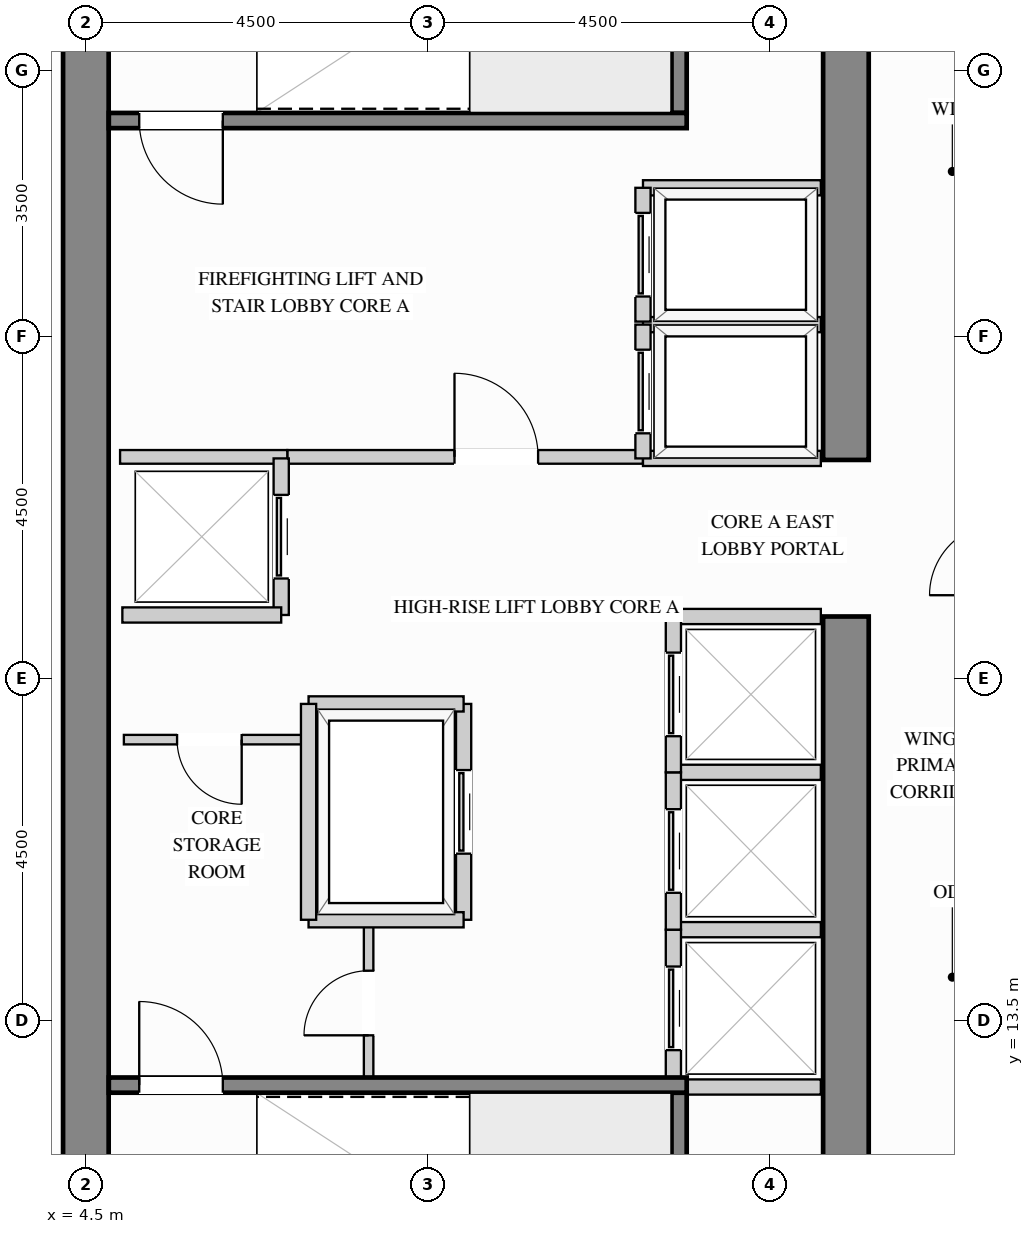
"""IFC4 building model, lengths in metres.
Left out: names, types, materials, properties, quantities, classifications, styles, units other than length and angle.
Written with IfcOpenShell. Run it as: python <this file> out.ifc"""

import sys

from ifc_helpers import new_model, si_unit, direction, frame, frame_2d, origin, place, context, subcontext, project, spatial, rectangle, extrude, source, transform, mapped, element, fill, save


model = new_model("IFC4")
c1 = context("Model", 3, precision=1e-05, world=origin(), true_north=direction((0.0, 1.0)))
c2 = subcontext(c1, "Body", "Model", "MODEL_VIEW")
j1 = project(units=[si_unit("LENGTHUNIT", "METRE"), si_unit("PLANEANGLEUNIT", "RADIAN")], contexts=[c1])
p1 = place(None, origin())
s1 = spatial("IfcSite", under=j1, at=p1, CompositionType="ELEMENT")
p2 = place(p1, origin())
s2 = spatial("IfcBuilding", under=s1, at=p2, CompositionType="ELEMENT")
p3 = place(p2, frame((0.0, 0.0, 161.1)))
s3 = spatial("IfcBuildingStorey", under=s2, at=p3, CompositionType="ELEMENT", Elevation=161.1)
m1 = source(origin(), c2, "Body", "SweptSolid", [
    extrude(rectangle(XDim=10.02, YDim=0.6, at=frame_2d((5.01, 0.0))), origin(), (0.0, 0.0, 1.0), 3.4),
])
p4 = place(p3, frame((14.5, 8.8, 0.0), z_axis=(0.0, 0.0, 1.0), x_axis=(0.0, 1.0, 0.0)))
e1 = element("IfcWall", 1, at=p4, inside=s3, PredefinedType="SHEAR", context=c2, shape_type="MappedRepresentation", body=[
    mapped(m1, transform((0.0, 0.0, 0.0), x_axis=(1.0, 0.0, 0.0), y_axis=(0.0, 1.0, 0.0), z_axis=(0.0, 0.0, 1.0))),
])
m2 = source(origin(), c2, "Body", "SweptSolid", [
    extrude(rectangle(XDim=8.32, YDim=0.6, at=frame_2d((4.16, 0.0))), origin(), (0.0, 0.0, 1.0), 3.4),
])
p5 = place(p3, frame((14.5, 20.88, 0.0), z_axis=(0.0, 0.0, 1.0), x_axis=(0.0, 1.0, 0.0)))
e2 = element("IfcWall", 2, at=p5, inside=s3, PredefinedType="SHEAR", context=c2, shape_type="MappedRepresentation", body=[
    mapped(m2, transform((0.0, 0.0, 0.0), x_axis=(1.0, 0.0, 0.0), y_axis=(0.0, 1.0, 0.0), z_axis=(0.0, 0.0, 1.0))),
])
m3 = source(origin(), c2, "Body", "SweptSolid", [
    extrude(rectangle(XDim=20.4, YDim=0.6, at=frame_2d((10.2, 0.0))), origin(), (0.0, 0.0, 1.0), 3.4),
])
p6 = place(p3, frame((4.5, 8.8, 0.0), z_axis=(0.0, 0.0, 1.0), x_axis=(0.0, 1.0, 0.0)))
e3 = element("IfcWall", 3, at=p6, inside=s3, PredefinedType="SHEAR", context=c2, shape_type="MappedRepresentation", body=[
    mapped(m3, transform((0.0, 0.0, 0.0), x_axis=(1.0, 0.0, 0.0), y_axis=(0.0, 1.0, 0.0), z_axis=(0.0, 0.0, 1.0))),
])
p7 = place(p3, frame((7.15, 20.92, 0.0), z_axis=(0.0, 0.0, 1.0), x_axis=(1.0, 0.0, 0.0)))
e4 = element("IfcWall", 4, at=p7, inside=s3, PredefinedType="PARTITIONING", context=c2, shape_type="SweptSolid", body=[
    extrude(rectangle(XDim=4.68, YDim=0.18, at=frame_2d((2.34, 0.0))), origin(), (0.0, 0.0, 1.0), 3.385),
])
p8 = place(p7, frame((2.2, 0.0, 0.0)))
e5 = element("IfcOpeningElement", 5, at=p8, cuts=e4, PredefinedType="OPENING", context=c2, shape_type="SweptSolid", body=[
    extrude(rectangle(XDim=1.1, YDim=2.15, at=frame_2d((0.55, 1.075))), frame((0.0, 0.1, 0.0), z_axis=(0.0, -1.0, 0.0), x_axis=(1.0, 0.0, 0.0)), (0.0, 0.0, 1.0), 0.2),
])
m4 = source(origin(), c2, "Body", "SweptSolid", [
    extrude(rectangle(XDim=2.2, YDim=0.18, at=frame_2d((1.1, 0.0))), origin(), (0.0, 0.0, 1.0), 3.385),
])
p9 = place(p3, frame((4.95, 20.92, 0.0), z_axis=(0.0, 0.0, 1.0), x_axis=(1.0, 0.0, 0.0)))
e6 = element("IfcWall", 6, at=p9, inside=s3, PredefinedType="PARTITIONING", context=c2, shape_type="MappedRepresentation", body=[
    mapped(m4, transform((0.0, 0.0, 0.0), x_axis=(1.0, 0.0, 0.0), y_axis=(0.0, 1.0, 0.0), z_axis=(0.0, 0.0, 1.0))),
])
p10 = place(p3, frame((8.22, 12.75, 0.0), z_axis=(0.0, 0.0, 1.0), x_axis=(0.0, 1.0, 0.0)))
e7 = element("IfcWall", 7, at=p10, inside=s3, PredefinedType="PARTITIONING", context=c2, shape_type="SweptSolid", body=[
    extrude(rectangle(XDim=2.07, YDim=0.125, at=frame_2d((1.035, 0.0))), origin(), (0.0, 0.0, 1.0), 3.385),
])
p11 = place(p10, frame((0.56, 0.0, 0.0)))
e8 = element("IfcOpeningElement", 8, at=p11, cuts=e7, PredefinedType="OPENING", context=c2, shape_type="SweptSolid", body=[
    extrude(rectangle(XDim=0.85, YDim=2.1, at=frame_2d((0.425, 1.05))), frame((0.0, 0.073, 0.0), z_axis=(0.0, -1.0, 0.0), x_axis=(1.0, 0.0, 0.0)), (0.0, 0.0, 1.0), 0.145),
])
p12 = place(p3, frame((5.0, 17.2, 0.0), z_axis=(0.0, 0.0, 1.0), x_axis=(1.0, 0.0, 0.0)))
e9 = element("IfcWall", 9, at=p12, inside=s3, PredefinedType="PARTITIONING", context=c2, shape_type="SweptSolid", body=[
    extrude(rectangle(XDim=2.4, YDim=0.125, at=frame_2d((1.2, 0.0))), origin(), (0.0, 0.0, 1.0), 3.385),
])
p13 = place(p12, frame((0.7, 0.0, 0.0)))
e10 = element("IfcOpeningElement", 10, at=p13, cuts=e9, PredefinedType="OPENING", context=c2, shape_type="SweptSolid", body=[
    extrude(rectangle(XDim=0.85, YDim=2.1, at=frame_2d((0.425, 1.05))), frame((0.0, 0.073, 0.0), z_axis=(0.0, -1.0, 0.0), x_axis=(1.0, 0.0, 0.0)), (0.0, 0.0, 1.0), 0.145),
])
m5 = source(origin(), c2, "Body", "SweptSolid", [
    extrude(rectangle(XDim=2.34, YDim=0.2, at=frame_2d((1.17, 0.0))), origin(), (0.0, 0.0, 1.0), 3.385),
])
for number, where, z_axis, x_axis in (
    (11, (11.83, 22.66, 0.0), (0.0, 0.0, 1.0), (1.0, 0.0, 0.0)),
    (12, (11.83, 20.9, 0.0), (0.0, 0.0, 1.0), (1.0, 0.0, 0.0)),
):
    element("IfcWall", number, at=place(p3, frame(where, z_axis=z_axis, x_axis=x_axis)), inside=s3, PredefinedType="PARTITIONING", context=c2, shape_type="MappedRepresentation", body=[
        mapped(m5, transform((0.0, 0.0, 0.0), x_axis=(1.0, 0.0, 0.0), y_axis=(0.0, 1.0, 0.0), z_axis=(0.0, 0.0, 1.0))),
    ])
p14 = place(p3, frame((11.83, 20.9, 0.0), z_axis=(0.0, 0.0, 1.0), x_axis=(0.0, 1.0, 0.0)))
e13 = element("IfcWall", 13, at=p14, inside=s3, PredefinedType="PARTITIONING", context=c2, shape_type="SweptSolid", body=[
    extrude(rectangle(XDim=1.76, YDim=0.2, at=frame_2d((0.88, 0.0))), origin(), (0.0, 0.0, 1.0), 3.385),
])
p15 = place(p14, frame((0.33, 0.0, 0.0)))
e14 = element("IfcOpeningElement", 14, at=p15, cuts=e13, PredefinedType="OPENING", context=c2, shape_type="SweptSolid", body=[
    extrude(rectangle(XDim=1.1, YDim=2.2, at=frame_2d((0.55, 1.1))), frame((0.0, 0.11, 0.0), z_axis=(0.0, -1.0, 0.0), x_axis=(1.0, 0.0, 0.0)), (0.0, 0.0, 1.0), 0.22),
])
p16 = place(p3, frame((11.83, 24.46, 0.0), z_axis=(0.0, 0.0, 1.0), x_axis=(1.0, 0.0, 0.0)))
e15 = element("IfcWall", 15, at=p16, inside=s3, PredefinedType="PARTITIONING", context=c2, shape_type="MappedRepresentation", body=[
    mapped(m5, transform((0.0, 0.0, 0.0), x_axis=(1.0, 0.0, 0.0), y_axis=(0.0, 1.0, 0.0), z_axis=(0.0, 0.0, 1.0))),
])
p17 = place(p3, frame((11.83, 22.7, 0.0), z_axis=(0.0, 0.0, 1.0), x_axis=(0.0, 1.0, 0.0)))
e16 = element("IfcWall", 16, at=p17, inside=s3, PredefinedType="PARTITIONING", context=c2, shape_type="SweptSolid", body=[
    extrude(rectangle(XDim=1.76, YDim=0.2, at=frame_2d((0.88, 0.0))), origin(), (0.0, 0.0, 1.0), 3.385),
])
p18 = place(p17, frame((0.33, 0.0, 0.0)))
e17 = element("IfcOpeningElement", 17, at=p18, cuts=e16, PredefinedType="OPENING", context=c2, shape_type="SweptSolid", body=[
    extrude(rectangle(XDim=1.1, YDim=2.2, at=frame_2d((0.55, 1.1))), frame((0.0, 0.11, 0.0), z_axis=(0.0, -1.0, 0.0), x_axis=(1.0, 0.0, 0.0)), (0.0, 0.0, 1.0), 0.22),
])
m6 = source(origin(), c2, "Body", "SweptSolid", [
    extrude(rectangle(XDim=1.94, YDim=0.2, at=frame_2d((0.97, 0.0))), origin(), (0.0, 0.0, 1.0), 3.385),
])
for number, where, z_axis, x_axis in (
    (18, (12.23, 14.7, 0.0), (0.0, 0.0, 1.0), (1.0, 0.0, 0.0)),
    (19, (12.23, 12.63, 0.0), (0.0, 0.0, 1.0), (1.0, 0.0, 0.0)),
):
    element("IfcWall", number, at=place(p3, frame(where, z_axis=z_axis, x_axis=x_axis)), inside=s3, PredefinedType="PARTITIONING", context=c2, shape_type="MappedRepresentation", body=[
        mapped(m6, transform((0.0, 0.0, 0.0), x_axis=(1.0, 0.0, 0.0), y_axis=(0.0, 1.0, 0.0), z_axis=(0.0, 0.0, 1.0))),
    ])
p19 = place(p3, frame((12.23, 12.63, 0.0), z_axis=(0.0, 0.0, 1.0), x_axis=(0.0, 1.0, 0.0)))
e20 = element("IfcWall", 20, at=p19, inside=s3, PredefinedType="PARTITIONING", context=c2, shape_type="SweptSolid", body=[
    extrude(rectangle(XDim=2.07, YDim=0.2, at=frame_2d((1.035, 0.0))), origin(), (0.0, 0.0, 1.0), 3.385),
])
p20 = place(p19, frame((0.485, 0.0, 0.0)))
e21 = element("IfcOpeningElement", 21, at=p20, cuts=e20, PredefinedType="OPENING", context=c2, shape_type="SweptSolid", body=[
    extrude(rectangle(XDim=1.1, YDim=2.2, at=frame_2d((0.55, 1.1))), frame((0.0, 0.11, 0.0), z_axis=(0.0, -1.0, 0.0), x_axis=(1.0, 0.0, 0.0)), (0.0, 0.0, 1.0), 0.22),
])
p21 = place(p3, frame((12.23, 16.77, 0.0), z_axis=(0.0, 0.0, 1.0), x_axis=(1.0, 0.0, 0.0)))
e22 = element("IfcWall", 22, at=p21, inside=s3, PredefinedType="PARTITIONING", context=c2, shape_type="MappedRepresentation", body=[
    mapped(m6, transform((0.0, 0.0, 0.0), x_axis=(1.0, 0.0, 0.0), y_axis=(0.0, 1.0, 0.0), z_axis=(0.0, 0.0, 1.0))),
])
p22 = place(p3, frame((12.23, 14.7, 0.0), z_axis=(0.0, 0.0, 1.0), x_axis=(0.0, 1.0, 0.0)))
e23 = element("IfcWall", 23, at=p22, inside=s3, PredefinedType="PARTITIONING", context=c2, shape_type="SweptSolid", body=[
    extrude(rectangle(XDim=2.07, YDim=0.2, at=frame_2d((1.035, 0.0))), origin(), (0.0, 0.0, 1.0), 3.385),
])
p23 = place(p22, frame((0.485, 0.0, 0.0)))
e24 = element("IfcOpeningElement", 24, at=p23, cuts=e23, PredefinedType="OPENING", context=c2, shape_type="SweptSolid", body=[
    extrude(rectangle(XDim=1.1, YDim=2.2, at=frame_2d((0.55, 1.1))), frame((0.0, 0.11, 0.0), z_axis=(0.0, -1.0, 0.0), x_axis=(1.0, 0.0, 0.0)), (0.0, 0.0, 1.0), 0.22),
])
p24 = place(p3, frame((12.23, 18.82, 0.0), z_axis=(0.0, 0.0, 1.0), x_axis=(1.0, 0.0, 0.0)))
e25 = element("IfcWall", 25, at=p24, inside=s3, PredefinedType="PARTITIONING", context=c2, shape_type="MappedRepresentation", body=[
    mapped(m6, transform((0.0, 0.0, 0.0), x_axis=(1.0, 0.0, 0.0), y_axis=(0.0, 1.0, 0.0), z_axis=(0.0, 0.0, 1.0))),
])
p25 = place(p3, frame((12.23, 16.77, 0.0), z_axis=(0.0, 0.0, 1.0), x_axis=(0.0, 1.0, 0.0)))
e26 = element("IfcWall", 26, at=p25, inside=s3, PredefinedType="PARTITIONING", context=c2, shape_type="SweptSolid", body=[
    extrude(rectangle(XDim=2.05, YDim=0.2, at=frame_2d((1.025, 0.0))), origin(), (0.0, 0.0, 1.0), 3.385),
])
p26 = place(p25, frame((0.475, 0.0, 0.0)))
e27 = element("IfcOpeningElement", 27, at=p26, cuts=e26, PredefinedType="OPENING", context=c2, shape_type="SweptSolid", body=[
    extrude(rectangle(XDim=1.1, YDim=2.2, at=frame_2d((0.55, 1.1))), frame((0.0, 0.11, 0.0), z_axis=(0.0, -1.0, 0.0), x_axis=(1.0, 0.0, 0.0)), (0.0, 0.0, 1.0), 0.22),
])
p27 = place(p3, frame((7.07, 18.84, 0.0), z_axis=(0.0, 0.0, 1.0), x_axis=(0.0, 1.0, 0.0)))
e28 = element("IfcWall", 28, at=p27, inside=s3, PredefinedType="PARTITIONING", context=c2, shape_type="SweptSolid", body=[
    extrude(rectangle(XDim=2.06, YDim=0.2, at=frame_2d((1.03, 0.0))), origin(), (0.0, 0.0, 1.0), 3.385),
])
p28 = place(p27, frame((0.48, 0.0, 0.0)))
e29 = element("IfcOpeningElement", 29, at=p28, cuts=e28, PredefinedType="OPENING", context=c2, shape_type="SweptSolid", body=[
    extrude(rectangle(XDim=1.1, YDim=2.2, at=frame_2d((0.55, 1.1))), frame((0.0, 0.11, 0.0), z_axis=(0.0, -1.0, 0.0), x_axis=(1.0, 0.0, 0.0)), (0.0, 0.0, 1.0), 0.22),
])
m7 = source(origin(), c2, "Body", "SweptSolid", [
    extrude(rectangle(XDim=2.09, YDim=0.2, at=frame_2d((1.045, 0.0))), origin(), (0.0, 0.0, 1.0), 3.385),
])
p29 = place(p3, frame((4.98, 18.84, 0.0), z_axis=(0.0, 0.0, 1.0), x_axis=(1.0, 0.0, 0.0)))
e30 = element("IfcWall", 30, at=p29, inside=s3, PredefinedType="PARTITIONING", context=c2, shape_type="MappedRepresentation", body=[
    mapped(m7, transform((0.0, 0.0, 0.0), x_axis=(1.0, 0.0, 0.0), y_axis=(0.0, 1.0, 0.0), z_axis=(0.0, 0.0, 1.0))),
])
p30 = place(p3, frame((9.47, 14.83, 0.0), z_axis=(0.0, 0.0, 1.0), x_axis=(0.0, 1.0, 0.0)))
e31 = element("IfcWall", 31, at=p30, inside=s3, PredefinedType="PARTITIONING", context=c2, shape_type="SweptSolid", body=[
    extrude(rectangle(XDim=2.84, YDim=0.2, at=frame_2d((1.42, 0.0))), origin(), (0.0, 0.0, 1.0), 3.385),
])
p31 = place(p30, frame((0.87, 0.0, 0.0)))
e32 = element("IfcOpeningElement", 32, at=p31, cuts=e31, PredefinedType="OPENING", context=c2, shape_type="SweptSolid", body=[
    extrude(rectangle(XDim=1.1, YDim=2.2, at=frame_2d((0.55, 1.1))), frame((0.0, 0.11, 0.0), z_axis=(0.0, -1.0, 0.0), x_axis=(1.0, 0.0, 0.0)), (0.0, 0.0, 1.0), 0.22),
])
m8 = source(origin(), c2, "Body", "SweptSolid", [
    extrude(rectangle(XDim=2.04, YDim=0.2, at=frame_2d((1.02, 0.0))), origin(), (0.0, 0.0, 1.0), 3.385),
])
for number, where, z_axis, x_axis in (
    (33, (7.43, 17.67, 0.0), (0.0, 0.0, 1.0), (1.0, 0.0, 0.0)),
    (34, (7.43, 14.83, 0.0), (0.0, 0.0, 1.0), (1.0, 0.0, 0.0)),
):
    element("IfcWall", number, at=place(p3, frame(where, z_axis=z_axis, x_axis=x_axis)), inside=s3, PredefinedType="PARTITIONING", context=c2, shape_type="MappedRepresentation", body=[
        mapped(m8, transform((0.0, 0.0, 0.0), x_axis=(1.0, 0.0, 0.0), y_axis=(0.0, 1.0, 0.0), z_axis=(0.0, 0.0, 1.0))),
    ])
m9 = source(origin(), c2, "Body", "SweptSolid", [
    extrude(rectangle(XDim=2.84, YDim=0.2, at=frame_2d((1.42, 0.0))), origin(), (0.0, 0.0, 1.0), 3.385),
])
p32 = place(p3, frame((7.43, 14.83, 0.0), z_axis=(0.0, 0.0, 1.0), x_axis=(0.0, 1.0, 0.0)))
e35 = element("IfcWall", 35, at=p32, inside=s3, PredefinedType="PARTITIONING", context=c2, shape_type="MappedRepresentation", body=[
    mapped(m9, transform((0.0, 0.0, 0.0), x_axis=(1.0, 0.0, 0.0), y_axis=(0.0, 1.0, 0.0), z_axis=(0.0, 0.0, 1.0))),
])
m10 = source(origin(), c2, "Body", "SweptSolid", [
    extrude(rectangle(XDim=3.753, YDim=0.2, at=frame_2d((1.876, 0.0))), origin(), (0.0, 0.0, 1.0), 3.4),
])
p33 = place(p3, frame((12.305, 8.802, 0.0), z_axis=(0.0, 0.0, 1.0), x_axis=(0.0, 1.0, 0.0)))
e36 = element("IfcWall", 36, at=p33, inside=s3, PredefinedType="SHEAR", context=c2, shape_type="MappedRepresentation", body=[
    mapped(m10, transform((0.0, 0.0, 0.0), x_axis=(1.0, 0.0, 0.0), y_axis=(0.0, 1.0, 0.0), z_axis=(0.0, 0.0, 1.0))),
])
p34 = place(p3, frame((4.802, 12.655, 0.0), z_axis=(0.0, 0.0, 1.0), x_axis=(1.0, 0.0, 0.0)))
e37 = element("IfcWall", 37, at=p34, inside=s3, PredefinedType="SHEAR", context=c2, shape_type="SweptSolid", body=[
    extrude(rectangle(XDim=7.603, YDim=0.2, at=frame_2d((3.802, 0.0))), origin(), (0.0, 0.0, 1.0), 3.4),
])
p35 = place(p34, frame((0.4, 0.0, 0.0)))
e38 = element("IfcOpeningElement", 38, at=p35, cuts=e37, PredefinedType="OPENING", context=c2, shape_type="SweptSolid", body=[
    extrude(rectangle(XDim=1.1, YDim=2.15, at=frame_2d((0.55, 1.075))), frame((0.0, 0.11, 0.0), z_axis=(0.0, -1.0, 0.0), x_axis=(1.0, 0.0, 0.0)), (0.0, 0.0, 1.0), 0.22),
])
p36 = place(p3, frame((12.305, 25.445, 0.0), z_axis=(0.0, 0.0, 1.0), x_axis=(0.0, 1.0, 0.0)))
e39 = element("IfcWall", 39, at=p36, inside=s3, PredefinedType="SHEAR", context=c2, shape_type="MappedRepresentation", body=[
    mapped(m10, transform((0.0, 0.0, 0.0), x_axis=(1.0, 0.0, 0.0), y_axis=(0.0, 1.0, 0.0), z_axis=(0.0, 0.0, 1.0))),
])
p37 = place(p3, frame((4.802, 25.345, 0.0), z_axis=(0.0, 0.0, 1.0), x_axis=(1.0, 0.0, 0.0)))
e40 = element("IfcWall", 40, at=p37, inside=s3, PredefinedType="SHEAR", context=c2, shape_type="SweptSolid", body=[
    extrude(rectangle(XDim=7.603, YDim=0.2, at=frame_2d((3.802, 0.0))), origin(), (0.0, 0.0, 1.0), 3.4),
])
p38 = place(p37, frame((0.4, 0.0, 0.0)))
e41 = element("IfcOpeningElement", 41, at=p38, cuts=e40, PredefinedType="OPENING", context=c2, shape_type="SweptSolid", body=[
    extrude(rectangle(XDim=1.1, YDim=2.15, at=frame_2d((0.55, 1.075))), frame((0.0, 0.11, 0.0), z_axis=(0.0, -1.0, 0.0), x_axis=(1.0, 0.0, 0.0)), (0.0, 0.0, 1.0), 0.22),
])
m11 = source(origin(), c2, "Body", "SweptSolid", [
    extrude(rectangle(XDim=1.1, YDim=2.15, at=frame_2d((0.55, 1.075))), frame((0.0, 0.025, 0.0), z_axis=(0.0, -1.0, 0.0), x_axis=(1.0, 0.0, 0.0)), (0.0, 0.0, 1.0), 0.05),
])
p39 = place(p8, origin())
e42 = element("IfcDoor", 42, at=p39, inside=s3, OperationType="SINGLE_SWING_LEFT", PredefinedType="DOOR", context=c2, shape_type="MappedRepresentation", body=[
    mapped(m11, transform((0.0, 0.0, 0.0), x_axis=(1.0, 0.0, 0.0), y_axis=(0.0, 1.0, 0.0), z_axis=(0.0, 0.0, 1.0))),
])
fill(e5, e42)
m12 = source(origin(), c2, "Body", "SweptSolid", [
    extrude(rectangle(XDim=1.1, YDim=2.2, at=frame_2d((0.55, 1.1))), frame((0.0, 0.025, 0.0), z_axis=(0.0, -1.0, 0.0), x_axis=(1.0, 0.0, 0.0)), (0.0, 0.0, 1.0), 0.05),
])
p40 = place(p15, origin())
e43 = element("IfcDoor", 43, at=p40, inside=s3, OperationType="SLIDING_TO_LEFT", PredefinedType="DOOR", context=c2, shape_type="MappedRepresentation", body=[
    mapped(m12, transform((0.0, 0.0, 0.0), x_axis=(1.0, 0.0, 0.0), y_axis=(0.0, 1.0, 0.0), z_axis=(0.0, 0.0, 1.0))),
])
fill(e14, e43)
p41 = place(p18, origin())
e44 = element("IfcDoor", 44, at=p41, inside=s3, OperationType="SLIDING_TO_LEFT", PredefinedType="DOOR", context=c2, shape_type="MappedRepresentation", body=[
    mapped(m12, transform((0.0, 0.0, 0.0), x_axis=(1.0, 0.0, 0.0), y_axis=(0.0, 1.0, 0.0), z_axis=(0.0, 0.0, 1.0))),
])
fill(e17, e44)
p42 = place(p20, origin())
e45 = element("IfcDoor", 45, at=p42, inside=s3, OperationType="SLIDING_TO_LEFT", PredefinedType="DOOR", context=c2, shape_type="MappedRepresentation", body=[
    mapped(m12, transform((0.0, 0.0, 0.0), x_axis=(1.0, 0.0, 0.0), y_axis=(0.0, 1.0, 0.0), z_axis=(0.0, 0.0, 1.0))),
])
fill(e21, e45)
p43 = place(p23, origin())
e46 = element("IfcDoor", 46, at=p43, inside=s3, OperationType="SLIDING_TO_LEFT", PredefinedType="DOOR", context=c2, shape_type="MappedRepresentation", body=[
    mapped(m12, transform((0.0, 0.0, 0.0), x_axis=(1.0, 0.0, 0.0), y_axis=(0.0, 1.0, 0.0), z_axis=(0.0, 0.0, 1.0))),
])
fill(e24, e46)
p44 = place(p26, origin())
e47 = element("IfcDoor", 47, at=p44, inside=s3, OperationType="SLIDING_TO_LEFT", PredefinedType="DOOR", context=c2, shape_type="MappedRepresentation", body=[
    mapped(m12, transform((0.0, 0.0, 0.0), x_axis=(1.0, 0.0, 0.0), y_axis=(0.0, 1.0, 0.0), z_axis=(0.0, 0.0, 1.0))),
])
fill(e27, e47)
p45 = place(p28, origin())
e48 = element("IfcDoor", 48, at=p45, inside=s3, OperationType="SLIDING_TO_LEFT", PredefinedType="DOOR", context=c2, shape_type="MappedRepresentation", body=[
    mapped(m12, transform((0.0, 0.0, 0.0), x_axis=(1.0, 0.0, 0.0), y_axis=(0.0, 1.0, 0.0), z_axis=(0.0, 0.0, 1.0))),
])
fill(e29, e48)
p46 = place(p31, origin())
e49 = element("IfcDoor", 49, at=p46, inside=s3, OperationType="SLIDING_TO_LEFT", PredefinedType="DOOR", context=c2, shape_type="MappedRepresentation", body=[
    mapped(m12, transform((0.0, 0.0, 0.0), x_axis=(1.0, 0.0, 0.0), y_axis=(0.0, 1.0, 0.0), z_axis=(0.0, 0.0, 1.0))),
])
fill(e32, e49)
m13 = source(origin(), c2, "Body", "SweptSolid", [
    extrude(rectangle(XDim=0.85, YDim=2.1, at=frame_2d((0.425, 1.05))), frame((0.0, 0.025, 0.0), z_axis=(0.0, -1.0, 0.0), x_axis=(1.0, 0.0, 0.0)), (0.0, 0.0, 1.0), 0.05),
])
p47 = place(p13, origin())
e50 = element("IfcDoor", 50, at=p47, inside=s3, OperationType="SINGLE_SWING_RIGHT", PredefinedType="DOOR", context=c2, shape_type="MappedRepresentation", body=[
    mapped(m13, transform((0.0, 0.0, 0.0), x_axis=(1.0, 0.0, 0.0), y_axis=(0.0, 1.0, 0.0), z_axis=(0.0, 0.0, 1.0))),
])
fill(e10, e50)
p48 = place(p11, origin())
e51 = element("IfcDoor", 51, at=p48, inside=s3, OperationType="SINGLE_SWING_LEFT", PredefinedType="DOOR", context=c2, shape_type="MappedRepresentation", body=[
    mapped(m13, transform((0.0, 0.0, 0.0), x_axis=(1.0, 0.0, 0.0), y_axis=(0.0, 1.0, 0.0), z_axis=(0.0, 0.0, 1.0))),
])
fill(e8, e51)
m14 = source(origin(), c2, "Body", "SweptSolid", [
    extrude(rectangle(XDim=1.1, YDim=2.15, at=frame_2d((0.55, 1.075))), frame((0.0, 0.025, 0.0), z_axis=(0.0, -1.0, 0.0), x_axis=(1.0, 0.0, 0.0)), (0.0, 0.0, 1.0), 0.05),
])
p49 = place(p35, origin())
e52 = element("IfcDoor", 52, at=p49, inside=s3, OperationType="SINGLE_SWING_LEFT", PredefinedType="DOOR", context=c2, shape_type="MappedRepresentation", body=[
    mapped(m14, transform((0.0, 0.0, 0.0), x_axis=(1.0, 0.0, 0.0), y_axis=(0.0, 1.0, 0.0), z_axis=(0.0, 0.0, 1.0))),
])
fill(e38, e52)
p50 = place(p38, origin())
e53 = element("IfcDoor", 53, at=p50, inside=s3, OperationType="SINGLE_SWING_RIGHT", PredefinedType="DOOR", context=c2, shape_type="MappedRepresentation", body=[
    mapped(m14, transform((0.0, 0.0, 0.0), x_axis=(1.0, 0.0, 0.0), y_axis=(0.0, 1.0, 0.0), z_axis=(0.0, 0.0, 1.0))),
])
fill(e41, e53)
save(model, sys.argv[1])
